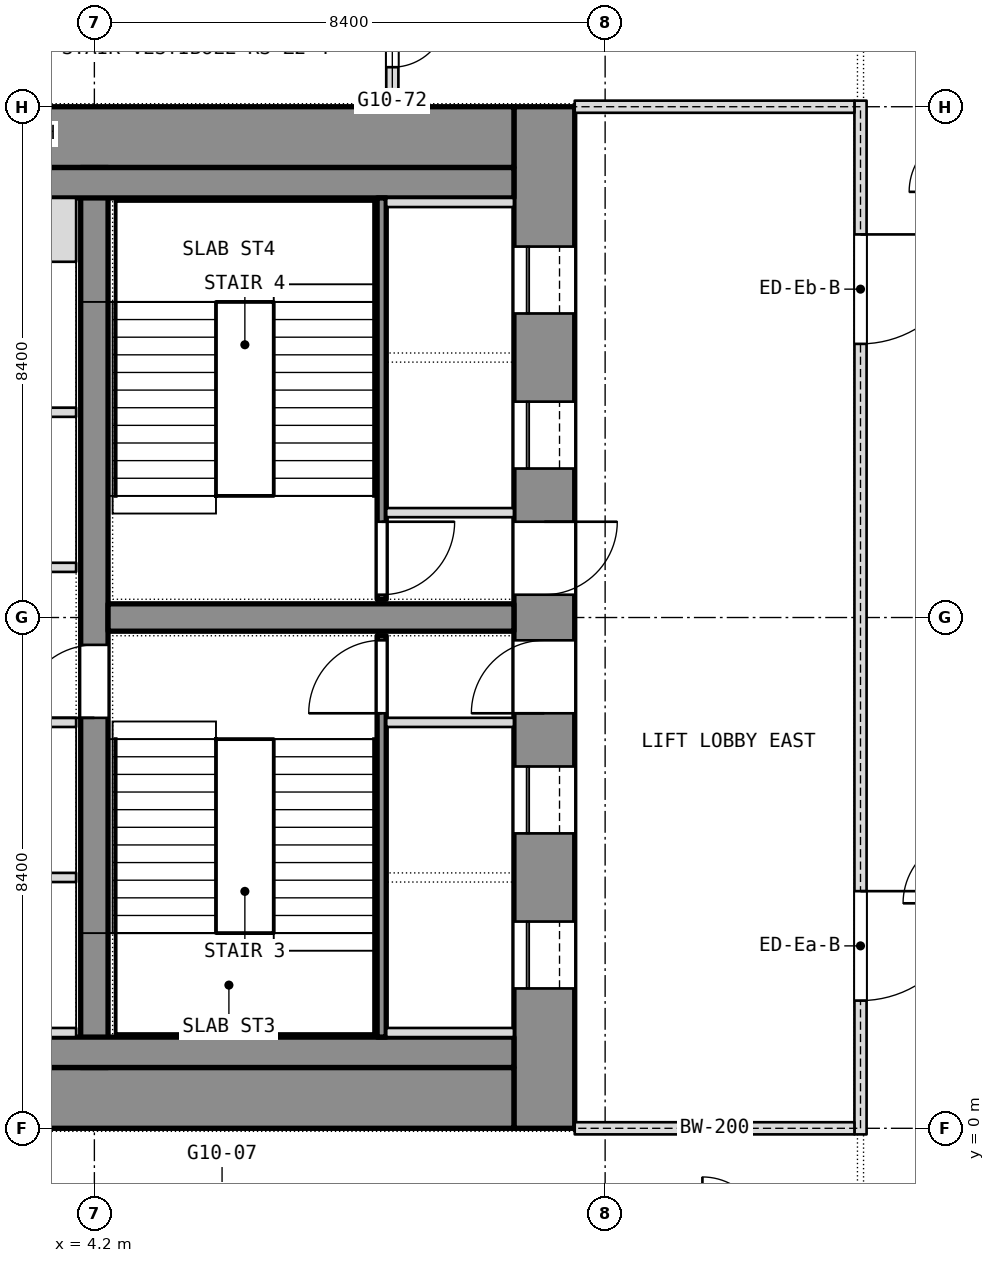
"""IFC4 building model, lengths in metres.
Left out: names, types, materials, properties, quantities, classifications, styles, units other than length and angle.
Written with IfcOpenShell. Run it as: python <this file> out.ifc"""

import sys

from ifc_helpers import new_model, si_unit, direction, frame, frame_2d, origin, place, context, subcontext, project, spatial, rectangle, extrude, element, fill, save


model = new_model("IFC4")
c1 = context("Model", 3, precision=1e-05, world=origin(), true_north=direction((0.0, 1.0)))
c2 = subcontext(c1, "Body", "Model", "MODEL_VIEW")
j1 = project(units=[si_unit("LENGTHUNIT", "METRE"), si_unit("PLANEANGLEUNIT", "RADIAN")], contexts=[c1])
p1 = place(None, origin())
s1 = spatial("IfcSite", under=j1, at=p1, CompositionType="ELEMENT")
p2 = place(p1, origin())
s2 = spatial("IfcBuilding", under=s1, at=p2, CompositionType="ELEMENT")
p3 = place(p2, frame((0.0, 0.0, 130.1)))
s3 = spatial("IfcBuildingStorey", under=s2, at=p3, CompositionType="ELEMENT", Elevation=130.1)
p4 = place(p3, frame((11.6, 0.0, 0.0), z_axis=(0.0, 0.0, 1.0), x_axis=(0.0, 1.0, 0.0)))
e1 = element("IfcWall", 1, at=p4, inside=s3, PredefinedType="SHEAR", context=c2, shape_type="SweptSolid", body=[
    extrude(rectangle(XDim=16.8, YDim=1.0, at=frame_2d((8.4, 0.0))), origin(), (0.0, 0.0, 1.0), 3.6),
])
p5 = place(p4, frame((2.3, 0.0, 0.0)))
e2 = element("IfcOpeningElement", 2, at=p5, cuts=e1, PredefinedType="OPENING", context=c2, shape_type="SweptSolid", body=[
    extrude(rectangle(XDim=1.1, YDim=2.1, at=frame_2d((0.55, 1.05))), frame((0.0, 0.5, 0.0), z_axis=(0.0, -1.0, 0.0), x_axis=(1.0, 0.0, 0.0)), (0.0, 0.0, 1.0), 1.0),
])
p6 = place(p4, frame((4.85, 0.0, 0.0)))
e3 = element("IfcOpeningElement", 3, at=p6, cuts=e1, PredefinedType="OPENING", context=c2, shape_type="SweptSolid", body=[
    extrude(rectangle(XDim=1.1, YDim=2.1, at=frame_2d((0.55, 1.05))), frame((0.0, 0.5, 0.0), z_axis=(0.0, -1.0, 0.0), x_axis=(1.0, 0.0, 0.0)), (0.0, 0.0, 1.0), 1.0),
])
p7 = place(p4, frame((6.825, 0.0, 0.0)))
e4 = element("IfcOpeningElement", 4, at=p7, cuts=e1, PredefinedType="OPENING", context=c2, shape_type="SweptSolid", body=[
    extrude(rectangle(XDim=1.2, YDim=2.1, at=frame_2d((0.6, 1.05))), frame((0.0, 0.5, 0.0), z_axis=(0.0, -1.0, 0.0), x_axis=(1.0, 0.0, 0.0)), (0.0, 0.0, 1.0), 1.0),
])
p8 = place(p4, frame((13.4, 0.0, 0.0)))
e5 = element("IfcOpeningElement", 5, at=p8, cuts=e1, PredefinedType="OPENING", context=c2, shape_type="SweptSolid", body=[
    extrude(rectangle(XDim=1.1, YDim=2.1, at=frame_2d((0.55, 1.05))), frame((0.0, 0.5, 0.0), z_axis=(0.0, -1.0, 0.0), x_axis=(1.0, 0.0, 0.0)), (0.0, 0.0, 1.0), 1.0),
])
p9 = place(p4, frame((10.85, 0.0, 0.0)))
e6 = element("IfcOpeningElement", 6, at=p9, cuts=e1, PredefinedType="OPENING", context=c2, shape_type="SweptSolid", body=[
    extrude(rectangle(XDim=1.1, YDim=2.1, at=frame_2d((0.55, 1.05))), frame((0.0, 0.5, 0.0), z_axis=(0.0, -1.0, 0.0), x_axis=(1.0, 0.0, 0.0)), (0.0, 0.0, 1.0), 1.0),
])
p10 = place(p4, frame((8.775, 0.0, 0.0)))
e7 = element("IfcOpeningElement", 7, at=p10, cuts=e1, PredefinedType="OPENING", context=c2, shape_type="SweptSolid", body=[
    extrude(rectangle(XDim=1.2, YDim=2.1, at=frame_2d((0.6, 1.05))), frame((0.0, 0.5, 0.0), z_axis=(0.0, -1.0, 0.0), x_axis=(1.0, 0.0, 0.0)), (0.0, 0.0, 1.0), 1.0),
])
for number, where, z_axis, x_axis in (
    (8, (-11.1, 0.5, 0.0), (0.0, 0.0, 1.0), (1.0, 0.0, 0.0)),
    (9, (-11.1, 16.3, 0.0), (0.0, 0.0, 1.0), (1.0, 0.0, 0.0)),
):
    element("IfcWall", number, at=place(p3, frame(where, z_axis=z_axis, x_axis=x_axis)), inside=s3, PredefinedType="SHEAR", context=c2, shape_type="SweptSolid", body=[
        extrude(rectangle(XDim=22.2, YDim=1.0, at=frame_2d((11.1, 0.0))), origin(), (0.0, 0.0, 1.0), 3.6),
    ])
p11 = place(p3, frame((4.2, 1.0, 0.0), z_axis=(0.0, 0.0, 1.0), x_axis=(0.0, 1.0, 0.0)))
e10 = element("IfcWall", 10, at=p11, inside=s3, PredefinedType="SHEAR", context=c2, shape_type="SweptSolid", body=[
    extrude(rectangle(XDim=14.8, YDim=0.45, at=frame_2d((7.4, 0.0))), origin(), (0.0, 0.0, 1.0), 3.6),
])
p12 = place(p11, frame((5.75, 0.0, 0.0)))
e11 = element("IfcOpeningElement", 11, at=p12, cuts=e10, PredefinedType="OPENING", context=c2, shape_type="SweptSolid", body=[
    extrude(rectangle(XDim=1.2, YDim=2.1, at=frame_2d((0.6, 1.05))), frame((0.0, 0.225, 0.0), z_axis=(0.0, -1.0, 0.0), x_axis=(1.0, 0.0, 0.0)), (0.0, 0.0, 1.0), 0.45),
])
p13 = place(p3, frame((4.425, 8.4, 0.0), z_axis=(0.0, 0.0, 1.0), x_axis=(1.0, 0.0, 0.0)))
e12 = element("IfcWall", 12, at=p13, inside=s3, PredefinedType="SHEAR", context=c2, shape_type="SweptSolid", body=[
    extrude(rectangle(XDim=6.675, YDim=0.45, at=frame_2d((3.337, 0.0))), origin(), (0.0, 0.0, 1.0), 3.6),
])
p14 = place(p3, frame((9.1, 16.9, 0.0), z_axis=(0.0, 0.0, 1.0), x_axis=(0.0, 1.0, 0.0)))
e13 = element("IfcWall", 13, at=p14, inside=s3, PredefinedType="PARTITIONING", context=c2, shape_type="SweptSolid", body=[
    extrude(rectangle(XDim=1.8, YDim=0.2, at=frame_2d((0.9, 0.0))), origin(), (0.0, 0.0, 1.0), 3.34),
])
p15 = place(p14, frame((0.55, 0.0, 0.0)))
e14 = element("IfcOpeningElement", 14, at=p15, cuts=e13, PredefinedType="OPENING", context=c2, shape_type="SweptSolid", body=[
    extrude(rectangle(XDim=0.9, YDim=2.1, at=frame_2d((0.45, 1.05))), frame((0.0, 0.1, 0.0), z_axis=(0.0, -1.0, 0.0), x_axis=(1.0, 0.0, 0.0)), (0.0, 0.0, 1.0), 0.2),
])
for number, where, z_axis, x_axis in (
    (15, (-11.1, 1.25, 0.0), (0.0, 0.0, 1.0), (1.0, 0.0, 0.0)),
    (16, (-11.1, 15.55, 0.0), (0.0, 0.0, 1.0), (1.0, 0.0, 0.0)),
):
    element("IfcWall", number, at=place(p3, frame(where, z_axis=z_axis, x_axis=x_axis)), inside=s3, PredefinedType="PARTITIONING", context=c2, shape_type="SweptSolid", body=[
        extrude(rectangle(XDim=22.2, YDim=0.5, at=frame_2d((11.1, 0.0))), origin(), (0.0, 0.0, 1.0), 3.34),
    ])
p16 = place(p3, frame((8.925, 1.5, 0.0), z_axis=(0.0, 0.0, 1.0), x_axis=(0.0, 1.0, 0.0)))
e17 = element("IfcWall", 17, at=p16, inside=s3, PredefinedType="SHEAR", context=c2, shape_type="SweptSolid", body=[
    extrude(rectangle(XDim=6.6, YDim=0.15, at=frame_2d((3.3, 0.0))), origin(), (0.0, 0.0, 1.0), 3.34),
])
p17 = place(p16, frame((5.325, 0.0, 0.0)))
e18 = element("IfcOpeningElement", 18, at=p17, cuts=e17, PredefinedType="OPENING", context=c2, shape_type="SweptSolid", body=[
    extrude(rectangle(XDim=1.2, YDim=2.1, at=frame_2d((0.6, 1.05))), frame((0.0, 0.075, 0.0), z_axis=(0.0, -1.0, 0.0), x_axis=(1.0, 0.0, 0.0)), (0.0, 0.0, 1.0), 0.15),
])
for number, where, z_axis, x_axis in (
    (19, (9.0, 6.675, 0.0), (0.0, 0.0, 1.0), (1.0, 0.0, 0.0)),
    (20, (9.0, 1.575, 0.0), (0.0, 0.0, 1.0), (1.0, 0.0, 0.0)),
):
    element("IfcWall", number, at=place(p3, frame(where, z_axis=z_axis, x_axis=x_axis)), inside=s3, PredefinedType="SHEAR", context=c2, shape_type="SweptSolid", body=[
        extrude(rectangle(XDim=2.1, YDim=0.15, at=frame_2d((1.05, 0.0))), origin(), (0.0, 0.0, 1.0), 3.6),
    ])
p18 = place(p3, frame((8.925, 8.7, 0.0), z_axis=(0.0, 0.0, 1.0), x_axis=(0.0, 1.0, 0.0)))
e21 = element("IfcWall", 21, at=p18, inside=s3, PredefinedType="SHEAR", context=c2, shape_type="SweptSolid", body=[
    extrude(rectangle(XDim=6.6, YDim=0.15, at=frame_2d((3.3, 0.0))), origin(), (0.0, 0.0, 1.0), 3.34),
])
p19 = place(p18, frame((0.075, 0.0, 0.0)))
e22 = element("IfcOpeningElement", 22, at=p19, cuts=e21, PredefinedType="OPENING", context=c2, shape_type="SweptSolid", body=[
    extrude(rectangle(XDim=1.2, YDim=2.1, at=frame_2d((0.6, 1.05))), frame((0.0, 0.075, 0.0), z_axis=(0.0, -1.0, 0.0), x_axis=(1.0, 0.0, 0.0)), (0.0, 0.0, 1.0), 0.15),
])
for number, where, z_axis, x_axis in (
    (23, (9.0, 10.125, 0.0), (0.0, 0.0, 1.0), (1.0, 0.0, 0.0)),
    (24, (9.0, 15.225, 0.0), (0.0, 0.0, 1.0), (1.0, 0.0, 0.0)),
):
    element("IfcWall", number, at=place(p3, frame(where, z_axis=z_axis, x_axis=x_axis)), inside=s3, PredefinedType="SHEAR", context=c2, shape_type="SweptSolid", body=[
        extrude(rectangle(XDim=2.1, YDim=0.15, at=frame_2d((1.05, 0.0))), origin(), (0.0, 0.0, 1.0), 3.6),
    ])
p20 = place(p3, frame((-3.9, 4.125, 0.0), z_axis=(0.0, 0.0, 1.0), x_axis=(1.0, 0.0, 0.0)))
e25 = element("IfcWall", 25, at=p20, inside=s3, PredefinedType="PARTITIONING", context=c2, shape_type="SweptSolid", body=[
    extrude(rectangle(XDim=7.8, YDim=0.15, at=frame_2d((3.9, 0.0))), origin(), (0.0, 0.0, 1.0), 3.34),
])
p21 = place(p20, frame((3.75, 0.0, 0.0)))
e26 = element("IfcOpeningElement", 26, at=p21, cuts=e25, PredefinedType="OPENING", context=c2, shape_type="SweptSolid", body=[
    extrude(rectangle(XDim=1.2, YDim=2.1, at=frame_2d((0.6, 1.05))), frame((0.0, 0.075, 0.0), z_axis=(0.0, -1.0, 0.0), x_axis=(1.0, 0.0, 0.0)), (0.0, 0.0, 1.0), 0.15),
])
p22 = place(p3, frame((-3.9, 11.775, 0.0), z_axis=(0.0, 0.0, 1.0), x_axis=(1.0, 0.0, 0.0)))
e27 = element("IfcWall", 27, at=p22, inside=s3, PredefinedType="PARTITIONING", context=c2, shape_type="SweptSolid", body=[
    extrude(rectangle(XDim=7.8, YDim=0.15, at=frame_2d((3.9, 0.0))), origin(), (0.0, 0.0, 1.0), 3.34),
])
p23 = place(p22, frame((3.3, 0.0, 0.0)))
e28 = element("IfcOpeningElement", 28, at=p23, cuts=e27, PredefinedType="OPENING", context=c2, shape_type="SweptSolid", body=[
    extrude(rectangle(XDim=1.2, YDim=2.1, at=frame_2d((0.6, 1.05))), frame((0.0, 0.075, 0.0), z_axis=(0.0, -1.0, 0.0), x_axis=(1.0, 0.0, 0.0)), (0.0, 0.0, 1.0), 0.15),
])
p24 = place(p3, frame((1.65, 1.575, 0.0), z_axis=(0.0, 0.0, 1.0), x_axis=(1.0, 0.0, 0.0)))
e29 = element("IfcWall", 29, at=p24, inside=s3, PredefinedType="SHEAR", context=c2, shape_type="SweptSolid", body=[
    extrude(rectangle(XDim=2.25, YDim=0.15, at=frame_2d((1.125, 0.0))), origin(), (0.0, 0.0, 1.0), 3.6),
])
p25 = place(p3, frame((1.65, 14.775, 0.0), z_axis=(0.0, 0.0, 1.0), x_axis=(1.0, 0.0, 0.0)))
e30 = element("IfcWall", 30, at=p25, inside=s3, PredefinedType="SHEAR", context=c2, shape_type="SweptSolid", body=[
    extrude(rectangle(XDim=2.25, YDim=1.05, at=frame_2d((1.125, 0.0))), origin(), (0.0, 0.0, 1.0), 3.6),
])
for number, where, z_axis, x_axis in (
    (31, (1.65, 6.675, 0.0), (0.0, 0.0, 1.0), (1.0, 0.0, 0.0)),
    (32, (1.65, 9.225, 0.0), (0.0, 0.0, 1.0), (1.0, 0.0, 0.0)),
):
    element("IfcWall", number, at=place(p3, frame(where, z_axis=z_axis, x_axis=x_axis)), inside=s3, PredefinedType="SHEAR", context=c2, shape_type="SweptSolid", body=[
        extrude(rectangle(XDim=2.25, YDim=0.15, at=frame_2d((1.125, 0.0))), origin(), (0.0, 0.0, 1.0), 3.6),
    ])
p26 = place(p3, frame((16.8, -0.1, 0.0), z_axis=(0.0, 0.0, 1.0), x_axis=(0.0, 1.0, 0.0)))
e33 = element("IfcWall", 33, at=p26, inside=s3, PredefinedType="PARTITIONING", context=c2, shape_type="SweptSolid", body=[
    extrude(rectangle(XDim=17.0, YDim=0.2, at=frame_2d((8.5, 0.0))), origin(), (0.0, 0.0, 1.0), 3.34),
])
p27 = place(p26, frame((2.2, 0.0, 0.0)))
e34 = element("IfcOpeningElement", 34, at=p27, cuts=e33, PredefinedType="OPENING", context=c2, shape_type="SweptSolid", body=[
    extrude(rectangle(XDim=1.8, YDim=2.1, at=frame_2d((0.9, 1.05))), frame((0.0, 0.1, 0.0), z_axis=(0.0, -1.0, 0.0), x_axis=(1.0, 0.0, 0.0)), (0.0, 0.0, 1.0), 0.2),
])
p28 = place(p26, frame((13.0, 0.0, 0.0)))
e35 = element("IfcOpeningElement", 35, at=p28, cuts=e33, PredefinedType="OPENING", context=c2, shape_type="SweptSolid", body=[
    extrude(rectangle(XDim=1.8, YDim=2.1, at=frame_2d((0.9, 1.05))), frame((0.0, 0.1, 0.0), z_axis=(0.0, -1.0, 0.0), x_axis=(1.0, 0.0, 0.0)), (0.0, 0.0, 1.0), 0.2),
])
for number, where, z_axis, x_axis in (
    (36, (12.1, 0.0, 0.0), (0.0, 0.0, 1.0), (1.0, 0.0, 0.0)),
    (37, (12.1, 16.8, 0.0), (0.0, 0.0, 1.0), (1.0, 0.0, 0.0)),
):
    element("IfcWall", number, at=place(p3, frame(where, z_axis=z_axis, x_axis=x_axis)), inside=s3, PredefinedType="PARTITIONING", context=c2, shape_type="SweptSolid", body=[
        extrude(rectangle(XDim=4.6, YDim=0.2, at=frame_2d((2.3, 0.0))), origin(), (0.0, 0.0, 1.0), 2.89),
    ])
p29 = place(p15, origin())
e38 = element("IfcDoor", 38, at=p29, inside=s3, OperationType="SINGLE_SWING_RIGHT", PredefinedType="DOOR", context=c2, shape_type="SweptSolid", body=[
    extrude(rectangle(XDim=0.9, YDim=2.1, at=frame_2d((0.45, 1.05))), frame((0.0, 0.025, 0.0), z_axis=(0.0, -1.0, 0.0), x_axis=(1.0, 0.0, 0.0)), (0.0, 0.0, 1.0), 0.05),
])
fill(e14, e38)
p30 = place(p5, origin())
e39 = element("IfcDoor", 39, at=p30, inside=s3, OperationType="SLIDING_TO_LEFT", PredefinedType="DOOR", context=c2, shape_type="SweptSolid", body=[
    extrude(rectangle(XDim=1.1, YDim=2.1, at=frame_2d((0.55, 1.05))), frame((0.0, 0.025, 0.0), z_axis=(0.0, -1.0, 0.0), x_axis=(1.0, 0.0, 0.0)), (0.0, 0.0, 1.0), 0.05),
])
fill(e2, e39)
p31 = place(p6, origin())
e40 = element("IfcDoor", 40, at=p31, inside=s3, OperationType="SLIDING_TO_LEFT", PredefinedType="DOOR", context=c2, shape_type="SweptSolid", body=[
    extrude(rectangle(XDim=1.1, YDim=2.1, at=frame_2d((0.55, 1.05))), frame((0.0, 0.025, 0.0), z_axis=(0.0, -1.0, 0.0), x_axis=(1.0, 0.0, 0.0)), (0.0, 0.0, 1.0), 0.05),
])
fill(e3, e40)
p32 = place(p7, origin())
e41 = element("IfcDoor", 41, at=p32, inside=s3, OperationType="SINGLE_SWING_LEFT", PredefinedType="DOOR", context=c2, shape_type="SweptSolid", body=[
    extrude(rectangle(XDim=1.2, YDim=2.1, at=frame_2d((0.6, 1.05))), frame((0.0, 0.025, 0.0), z_axis=(0.0, -1.0, 0.0), x_axis=(1.0, 0.0, 0.0)), (0.0, 0.0, 1.0), 0.05),
])
fill(e4, e41)
p33 = place(p17, origin())
e42 = element("IfcDoor", 42, at=p33, inside=s3, OperationType="SINGLE_SWING_LEFT", PredefinedType="DOOR", context=c2, shape_type="SweptSolid", body=[
    extrude(rectangle(XDim=1.2, YDim=2.1, at=frame_2d((0.6, 1.05))), frame((0.0, 0.025, 0.0), z_axis=(0.0, -1.0, 0.0), x_axis=(1.0, 0.0, 0.0)), (0.0, 0.0, 1.0), 0.05),
])
fill(e18, e42)
p34 = place(p8, origin())
e43 = element("IfcDoor", 43, at=p34, inside=s3, OperationType="SLIDING_TO_LEFT", PredefinedType="DOOR", context=c2, shape_type="SweptSolid", body=[
    extrude(rectangle(XDim=1.1, YDim=2.1, at=frame_2d((0.55, 1.05))), frame((0.0, 0.025, 0.0), z_axis=(0.0, -1.0, 0.0), x_axis=(1.0, 0.0, 0.0)), (0.0, 0.0, 1.0), 0.05),
])
fill(e5, e43)
p35 = place(p9, origin())
e44 = element("IfcDoor", 44, at=p35, inside=s3, OperationType="SLIDING_TO_LEFT", PredefinedType="DOOR", context=c2, shape_type="SweptSolid", body=[
    extrude(rectangle(XDim=1.1, YDim=2.1, at=frame_2d((0.55, 1.05))), frame((0.0, 0.025, 0.0), z_axis=(0.0, -1.0, 0.0), x_axis=(1.0, 0.0, 0.0)), (0.0, 0.0, 1.0), 0.05),
])
fill(e6, e44)
p36 = place(p10, origin())
e45 = element("IfcDoor", 45, at=p36, inside=s3, OperationType="SINGLE_SWING_LEFT", PredefinedType="DOOR", context=c2, shape_type="SweptSolid", body=[
    extrude(rectangle(XDim=1.2, YDim=2.1, at=frame_2d((0.6, 1.05))), frame((0.0, 0.025, 0.0), z_axis=(0.0, -1.0, 0.0), x_axis=(1.0, 0.0, 0.0)), (0.0, 0.0, 1.0), 0.05),
])
fill(e7, e45)
p37 = place(p19, origin())
e46 = element("IfcDoor", 46, at=p37, inside=s3, OperationType="SINGLE_SWING_LEFT", PredefinedType="DOOR", context=c2, shape_type="SweptSolid", body=[
    extrude(rectangle(XDim=1.2, YDim=2.1, at=frame_2d((0.6, 1.05))), frame((0.0, 0.025, 0.0), z_axis=(0.0, -1.0, 0.0), x_axis=(1.0, 0.0, 0.0)), (0.0, 0.0, 1.0), 0.05),
])
fill(e22, e46)
p38 = place(p12, origin())
e47 = element("IfcDoor", 47, at=p38, inside=s3, OperationType="SINGLE_SWING_LEFT", PredefinedType="DOOR", context=c2, shape_type="SweptSolid", body=[
    extrude(rectangle(XDim=1.2, YDim=2.1, at=frame_2d((0.6, 1.05))), frame((0.0, 0.025, 0.0), z_axis=(0.0, -1.0, 0.0), x_axis=(1.0, 0.0, 0.0)), (0.0, 0.0, 1.0), 0.05),
])
fill(e11, e47)
p39 = place(p27, origin())
e48 = element("IfcDoor", 48, at=p39, inside=s3, OperationType="DOUBLE_DOOR_SINGLE_SWING", PredefinedType="DOOR", context=c2, shape_type="SweptSolid", body=[
    extrude(rectangle(XDim=1.8, YDim=2.1, at=frame_2d((0.9, 1.05))), frame((0.0, 0.025, 0.0), z_axis=(0.0, -1.0, 0.0), x_axis=(1.0, 0.0, 0.0)), (0.0, 0.0, 1.0), 0.05),
])
fill(e34, e48)
p40 = place(p28, origin())
e49 = element("IfcDoor", 49, at=p40, inside=s3, OperationType="DOUBLE_DOOR_SINGLE_SWING", PredefinedType="DOOR", context=c2, shape_type="SweptSolid", body=[
    extrude(rectangle(XDim=1.8, YDim=2.1, at=frame_2d((0.9, 1.05))), frame((0.0, 0.025, 0.0), z_axis=(0.0, -1.0, 0.0), x_axis=(1.0, 0.0, 0.0)), (0.0, 0.0, 1.0), 0.05),
])
fill(e35, e49)
save(model, sys.argv[1])
